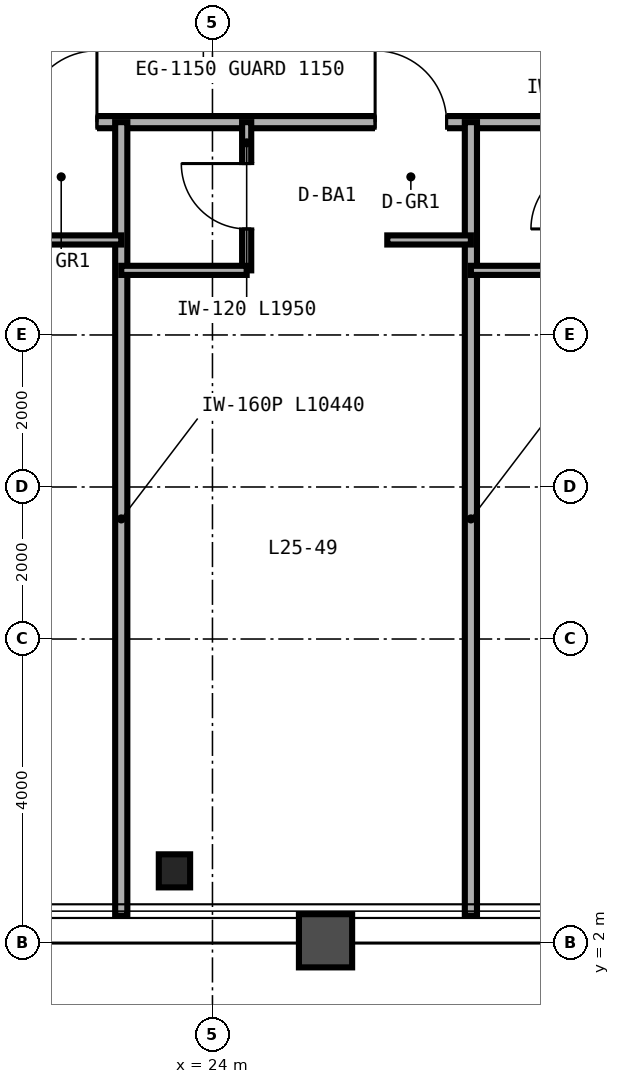
"""IFC4 building model, lengths in metres.
Left out: names, types, materials, properties, quantities, classifications, styles, units other than length and angle.
Written with IfcOpenShell. Run it as: python <this file> out.ifc"""

import sys

from ifc_helpers import new_model, si_unit, direction, frame, frame_2d, origin, origin_2d, place, context, subcontext, project, spatial, rectangle, i_section, extrude, source, transform, mapped, element, fill, save


model = new_model("IFC4")
c1 = context("Model", 3, precision=1e-05, world=origin(), true_north=direction((0.0, 1.0)))
c2 = subcontext(c1, "Body", "Model", "MODEL_VIEW")
j1 = project(units=[si_unit("LENGTHUNIT", "METRE"), si_unit("PLANEANGLEUNIT", "RADIAN")], contexts=[c1])
p1 = place(None, origin())
s1 = spatial("IfcSite", under=j1, at=p1, CompositionType="ELEMENT")
p2 = place(p1, origin())
s2 = spatial("IfcBuilding", under=s1, at=p2, CompositionType="ELEMENT")
p3 = place(p2, frame((0.0, 0.0, 104.4)))
s3 = spatial("IfcBuildingStorey", under=s2, at=p3, CompositionType="ELEMENT", Elevation=104.4)
m1 = source(origin(), c2, "Body", "SweptSolid", [
    extrude(i_section(OverallWidth=0.412, OverallDepth=0.435, WebThickness=0.036, FlangeThickness=0.057, FilletRadius=0.025, at=origin_2d()), origin(), (0.0, 0.0, 1.0), 3.36),
])
p4 = place(p3, frame((23.5, 2.95, 0.0), z_axis=(0.0, 0.0, 1.0), x_axis=(1.0, 0.0, 0.0)))
e1 = element("IfcColumn", 1, at=p4, inside=s3, PredefinedType="COLUMN", context=c2, shape_type="MappedRepresentation", body=[
    mapped(m1, transform((0.0, 0.0, 0.0), scale=1.0)),
])
p5 = place(p3, frame((14.0, 12.8, 0.0), z_axis=(0.0, 0.0, 1.0), x_axis=(1.0, 0.0, 0.0)))
e2 = element("IfcWall", 2, at=p5, inside=s3, PredefinedType="PARTITIONING", context=c2, shape_type="SweptSolid", body=[
    extrude(rectangle(XDim=36.0, YDim=0.16, at=frame_2d((18.0, 0.0))), origin(), (0.0, 0.0, 1.0), 2.581),
])
p6 = place(p5, frame((3.14, 0.0, 0.0)))
e3 = element("IfcOpeningElement", 3, at=p6, cuts=e2, PredefinedType="OPENING", context=c2, shape_type="SweptSolid", body=[
    extrude(rectangle(XDim=0.94, YDim=2.15, at=frame_2d((0.47, 1.075))), frame((0.0, 0.09, 0.0), z_axis=(0.0, -1.0, 0.0), x_axis=(1.0, 0.0, 0.0)), (0.0, 0.0, 1.0), 0.18),
])
p7 = place(p5, frame((7.54, 0.0, 0.0)))
e4 = element("IfcOpeningElement", 4, at=p7, cuts=e2, PredefinedType="OPENING", context=c2, shape_type="SweptSolid", body=[
    extrude(rectangle(XDim=0.94, YDim=2.15, at=frame_2d((0.47, 1.075))), frame((0.0, 0.09, 0.0), z_axis=(0.0, -1.0, 0.0), x_axis=(1.0, 0.0, 0.0)), (0.0, 0.0, 1.0), 0.18),
])
p8 = place(p5, frame((12.14, 0.0, 0.0)))
e5 = element("IfcOpeningElement", 5, at=p8, cuts=e2, PredefinedType="OPENING", context=c2, shape_type="SweptSolid", body=[
    extrude(rectangle(XDim=0.94, YDim=2.15, at=frame_2d((0.47, 1.075))), frame((0.0, 0.09, 0.0), z_axis=(0.0, -1.0, 0.0), x_axis=(1.0, 0.0, 0.0)), (0.0, 0.0, 1.0), 0.18),
])
p9 = place(p5, frame((16.94, 0.0, 0.0)))
e6 = element("IfcOpeningElement", 6, at=p9, cuts=e2, PredefinedType="OPENING", context=c2, shape_type="SweptSolid", body=[
    extrude(rectangle(XDim=0.94, YDim=2.15, at=frame_2d((0.47, 1.075))), frame((0.0, 0.09, 0.0), z_axis=(0.0, -1.0, 0.0), x_axis=(1.0, 0.0, 0.0)), (0.0, 0.0, 1.0), 0.18),
])
p10 = place(p5, frame((21.74, 0.0, 0.0)))
e7 = element("IfcOpeningElement", 7, at=p10, cuts=e2, PredefinedType="OPENING", context=c2, shape_type="SweptSolid", body=[
    extrude(rectangle(XDim=0.94, YDim=2.15, at=frame_2d((0.47, 1.075))), frame((0.0, 0.09, 0.0), z_axis=(0.0, -1.0, 0.0), x_axis=(1.0, 0.0, 0.0)), (0.0, 0.0, 1.0), 0.18),
])
p11 = place(p5, frame((26.34, 0.0, 0.0)))
e8 = element("IfcOpeningElement", 8, at=p11, cuts=e2, PredefinedType="OPENING", context=c2, shape_type="SweptSolid", body=[
    extrude(rectangle(XDim=0.94, YDim=2.15, at=frame_2d((0.47, 1.075))), frame((0.0, 0.09, 0.0), z_axis=(0.0, -1.0, 0.0), x_axis=(1.0, 0.0, 0.0)), (0.0, 0.0, 1.0), 0.18),
])
p12 = place(p5, frame((30.54, 0.0, 0.0)))
e9 = element("IfcOpeningElement", 9, at=p12, cuts=e2, PredefinedType="OPENING", context=c2, shape_type="SweptSolid", body=[
    extrude(rectangle(XDim=0.94, YDim=2.15, at=frame_2d((0.47, 1.075))), frame((0.0, 0.09, 0.0), z_axis=(0.0, -1.0, 0.0), x_axis=(1.0, 0.0, 0.0)), (0.0, 0.0, 1.0), 0.18),
])
p13 = place(p5, frame((34.74, 0.0, 0.0)))
e10 = element("IfcOpeningElement", 10, at=p13, cuts=e2, PredefinedType="OPENING", context=c2, shape_type="SweptSolid", body=[
    extrude(rectangle(XDim=0.94, YDim=2.15, at=frame_2d((0.47, 1.075))), frame((0.0, 0.09, 0.0), z_axis=(0.0, -1.0, 0.0), x_axis=(1.0, 0.0, 0.0)), (0.0, 0.0, 1.0), 0.18),
])
p14 = place(p3, frame((22.8, 2.36, 0.0), z_axis=(0.0, 0.0, 1.0), x_axis=(0.0, 1.0, 0.0)))
e11 = element("IfcWall", 11, at=p14, inside=s3, PredefinedType="PARTITIONING", context=c2, shape_type="SweptSolid", body=[
    extrude(rectangle(XDim=10.44, YDim=0.16, at=frame_2d((5.22, 0.0))), origin(), (0.0, 0.0, 1.0), 2.823),
])
p15 = place(p3, frame((21.7, 11.25, 0.0), z_axis=(0.0, 0.0, 1.0), x_axis=(1.0, 0.0, 0.0)))
e12 = element("IfcWall", 12, at=p15, inside=s3, PredefinedType="PARTITIONING", context=c2, shape_type="SweptSolid", body=[
    extrude(rectangle(XDim=1.1, YDim=0.12, at=frame_2d((0.55, 0.0))), origin(), (0.0, 0.0, 1.0), 3.36),
])
p16 = place(p3, frame((27.4, 2.36, 0.0), z_axis=(0.0, 0.0, 1.0), x_axis=(0.0, 1.0, 0.0)))
e13 = element("IfcWall", 13, at=p16, inside=s3, PredefinedType="PARTITIONING", context=c2, shape_type="SweptSolid", body=[
    extrude(rectangle(XDim=10.44, YDim=0.16, at=frame_2d((5.22, 0.0))), origin(), (0.0, 0.0, 1.0), 2.433),
])
p17 = place(p3, frame((24.45, 10.85, 0.0), z_axis=(0.0, 0.0, 1.0), x_axis=(0.0, 1.0, 0.0)))
e14 = element("IfcWall", 14, at=p17, inside=s3, PredefinedType="PARTITIONING", context=c2, shape_type="SweptSolid", body=[
    extrude(rectangle(XDim=1.95, YDim=0.12, at=frame_2d((0.975, 0.0))), origin(), (0.0, 0.0, 1.0), 3.36),
])
p18 = place(p17, frame((0.545, 0.0, 0.0)))
e15 = element("IfcOpeningElement", 15, at=p18, cuts=e14, PredefinedType="OPENING", context=c2, shape_type="SweptSolid", body=[
    extrude(rectangle(XDim=0.86, YDim=2.1, at=frame_2d((0.43, 1.05))), frame((0.0, 0.07, 0.0), z_axis=(0.0, -1.0, 0.0), x_axis=(1.0, 0.0, 0.0)), (0.0, 0.0, 1.0), 0.14),
])
p19 = place(p3, frame((22.8, 10.85, 0.0), z_axis=(0.0, 0.0, 1.0), x_axis=(1.0, 0.0, 0.0)))
e16 = element("IfcWall", 16, at=p19, inside=s3, PredefinedType="PARTITIONING", context=c2, shape_type="SweptSolid", body=[
    extrude(rectangle(XDim=1.65, YDim=0.12, at=frame_2d((0.825, 0.0))), origin(), (0.0, 0.0, 1.0), 2.581),
])
p20 = place(p3, frame((26.3, 11.25, 0.0), z_axis=(0.0, 0.0, 1.0), x_axis=(1.0, 0.0, 0.0)))
e17 = element("IfcWall", 17, at=p20, inside=s3, PredefinedType="PARTITIONING", context=c2, shape_type="SweptSolid", body=[
    extrude(rectangle(XDim=1.1, YDim=0.12, at=frame_2d((0.55, 0.0))), origin(), (0.0, 0.0, 1.0), 3.36),
])
p21 = place(p3, frame((27.4, 10.85, 0.0), z_axis=(0.0, 0.0, 1.0), x_axis=(1.0, 0.0, 0.0)))
e18 = element("IfcWall", 18, at=p21, inside=s3, PredefinedType="PARTITIONING", context=c2, shape_type="SweptSolid", body=[
    extrude(rectangle(XDim=1.65, YDim=0.12, at=frame_2d((0.825, 0.0))), origin(), (0.0, 0.0, 1.0), 3.36),
])
m2 = source(origin(), c2, "Body", "SweptSolid", [
    extrude(rectangle(XDim=0.86, YDim=2.1, at=frame_2d((0.43, 1.05))), frame((0.0, 0.025, 0.0), z_axis=(0.0, -1.0, 0.0), x_axis=(1.0, 0.0, 0.0)), (0.0, 0.0, 1.0), 0.05),
])
p22 = place(p18, origin())
e19 = element("IfcDoor", 19, at=p22, inside=s3, OperationType="SINGLE_SWING_RIGHT", PredefinedType="DOOR", context=c2, shape_type="MappedRepresentation", body=[
    mapped(m2, transform((0.0, 0.0, 0.0), scale=1.0)),
])
fill(e15, e19)
m3 = source(origin(), c2, "Body", "SweptSolid", [
    extrude(rectangle(XDim=0.94, YDim=2.15, at=frame_2d((0.47, 1.075))), frame((0.0, 0.025, 0.0), z_axis=(0.0, -1.0, 0.0), x_axis=(1.0, 0.0, 0.0)), (0.0, 0.0, 1.0), 0.05),
])
p23 = place(p7, origin())
e20 = element("IfcDoor", 20, at=p23, inside=s3, OperationType="SINGLE_SWING_RIGHT", PredefinedType="DOOR", context=c2, shape_type="MappedRepresentation", body=[
    mapped(m3, transform((0.0, 0.0, 0.0), scale=1.0)),
])
fill(e4, e20)
p24 = place(p8, origin())
e21 = element("IfcDoor", 21, at=p24, inside=s3, OperationType="SINGLE_SWING_LEFT", PredefinedType="DOOR", context=c2, shape_type="MappedRepresentation", body=[
    mapped(m3, transform((0.0, 0.0, 0.0), scale=1.0)),
])
fill(e5, e21)
save(model, sys.argv[1])
